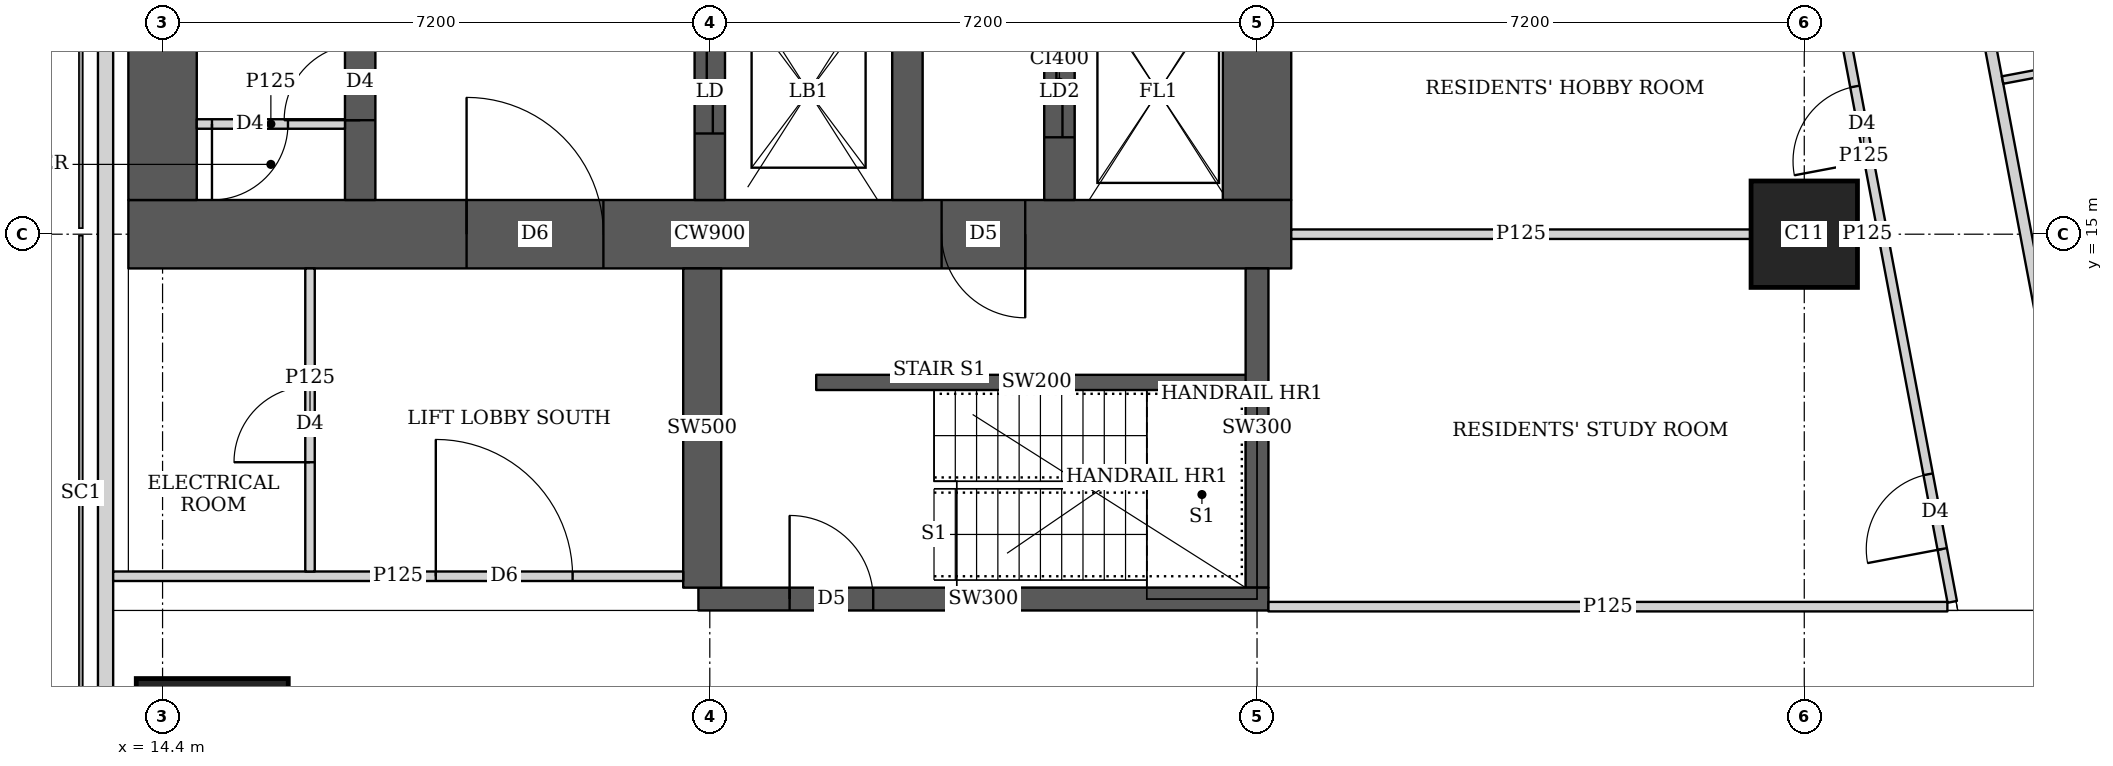
"""IFC4 building model, lengths in metres.
Left out: names, types, materials, properties, quantities, classifications, styles, units other than length and angle.
Written with IfcOpenShell. Run it as: python <this file> out.ifc"""

import sys

from ifc_helpers import new_model, si_unit, direction, frame, frame_2d, origin, origin_2d, place, context, subcontext, project, spatial, rectangle, extrude, element, fill, save


model = new_model("IFC4")
c1 = context("Model", 3, precision=1e-05, world=origin(), true_north=direction((0.0, 1.0)))
c2 = subcontext(c1, "Body", "Model", "MODEL_VIEW")
j1 = project(units=[si_unit("LENGTHUNIT", "METRE"), si_unit("PLANEANGLEUNIT", "RADIAN")], contexts=[c1])
p1 = place(None, origin())
s1 = spatial("IfcSite", under=j1, at=p1, CompositionType="ELEMENT")
p2 = place(p1, origin())
s2 = spatial("IfcBuilding", under=s1, at=p2, CompositionType="ELEMENT")
p3 = place(p2, frame((0.0, 0.0, 259.1)))
s3 = spatial("IfcBuildingStorey", under=s2, at=p3, CompositionType="ELEMENT", Elevation=259.1)
p4 = place(p3, frame((15.054, 8.154, 0.0), z_axis=(0.0, 0.0, 1.0), x_axis=(1.0, 0.0, 0.0)))
e1 = element("IfcColumn", 1, at=p4, inside=s3, PredefinedType="COLUMN", context=c2, shape_type="SweptSolid", body=[
    extrude(rectangle(XDim=2.0, YDim=2.0, at=origin_2d()), origin(), (0.0, 0.0, 1.0), 3.75),
])
p5 = place(p3, frame((36.0, 15.0, 0.0), z_axis=(0.0, 0.0, 1.0), x_axis=(1.0, 0.0, 0.0)))
e2 = element("IfcColumn", 2, at=p5, inside=s3, PredefinedType="COLUMN", context=c2, shape_type="SweptSolid", body=[
    extrude(rectangle(XDim=1.4, YDim=1.4, at=origin_2d()), origin(), (0.0, 0.0, 1.0), 3.75),
])
p6 = place(p3, frame((13.95, 15.0, 0.0), z_axis=(0.0, 0.0, 1.0), x_axis=(1.0, 0.0, 0.0)))
e3 = element("IfcWall", 3, at=p6, inside=s3, PredefinedType="SHEAR", context=c2, shape_type="SweptSolid", body=[
    extrude(rectangle(XDim=15.3, YDim=0.9, at=frame_2d((7.65, 0.0))), origin(), (0.0, 0.0, 1.0), 3.75),
])
p7 = place(p6, frame((4.45, 0.0, 0.0)))
e4 = element("IfcOpeningElement", 4, at=p7, cuts=e3, PredefinedType="OPENING", context=c2, shape_type="SweptSolid", body=[
    extrude(rectangle(XDim=1.8, YDim=2.1, at=frame_2d((0.9, 1.05))), frame((0.0, 0.46, 0.0), z_axis=(0.0, -1.0, 0.0), x_axis=(1.0, 0.0, 0.0)), (0.0, 0.0, 1.0), 0.92),
])
p8 = place(p6, frame((10.7, 0.0, 0.0)))
e5 = element("IfcOpeningElement", 5, at=p8, cuts=e3, PredefinedType="OPENING", context=c2, shape_type="SweptSolid", body=[
    extrude(rectangle(XDim=1.1, YDim=2.1, at=frame_2d((0.55, 1.05))), frame((0.0, 0.46, 0.0), z_axis=(0.0, -1.0, 0.0), x_axis=(1.0, 0.0, 0.0)), (0.0, 0.0, 1.0), 0.92),
])
for number, where, z_axis, x_axis in (
    (6, (14.4, 15.45, 0.0), (0.0, 0.0, 1.0), (0.0, 1.0, 0.0)),
    (7, (28.8, 15.45, 0.0), (0.0, 0.0, 1.0), (0.0, 1.0, 0.0)),
):
    element("IfcWall", number, at=place(p3, frame(where, z_axis=z_axis, x_axis=x_axis)), inside=s3, PredefinedType="SHEAR", context=c2, shape_type="SweptSolid", body=[
        extrude(rectangle(XDim=14.1, YDim=0.9, at=frame_2d((7.05, 0.0))), origin(), (0.0, 0.0, 1.0), 3.75),
    ])
p9 = place(p3, frame((17.0, 15.45, 0.0), z_axis=(0.0, 0.0, 1.0), x_axis=(0.0, 1.0, 0.0)))
e8 = element("IfcWall", 8, at=p9, inside=s3, PredefinedType="SHEAR", context=c2, shape_type="SweptSolid", body=[
    extrude(rectangle(XDim=14.1, YDim=0.4, at=frame_2d((7.05, 0.0))), origin(), (0.0, 0.0, 1.0), 3.75),
])
p10 = place(p9, frame((1.05, 0.0, 0.0)))
e9 = element("IfcOpeningElement", 9, at=p10, cuts=e8, PredefinedType="OPENING", context=c2, shape_type="SweptSolid", body=[
    extrude(rectangle(XDim=1.0, YDim=2.1, at=frame_2d((0.5, 1.05))), frame((0.0, 0.21, 0.0), z_axis=(0.0, -1.0, 0.0), x_axis=(1.0, 0.0, 0.0)), (0.0, 0.0, 1.0), 0.42),
])
p11 = place(p9, frame((4.675, 0.0, 0.0)))
e10 = element("IfcOpeningElement", 10, at=p11, cuts=e8, PredefinedType="OPENING", context=c2, shape_type="SweptSolid", body=[
    extrude(rectangle(XDim=1.0, YDim=2.1, at=frame_2d((0.5, 1.05))), frame((0.0, 0.21, 0.0), z_axis=(0.0, -1.0, 0.0), x_axis=(1.0, 0.0, 0.0)), (0.0, 0.0, 1.0), 0.42),
])
p12 = place(p9, frame((8.425, 0.0, 0.0)))
e11 = element("IfcOpeningElement", 11, at=p12, cuts=e8, PredefinedType="OPENING", context=c2, shape_type="SweptSolid", body=[
    extrude(rectangle(XDim=1.0, YDim=2.1, at=frame_2d((0.5, 1.05))), frame((0.0, 0.21, 0.0), z_axis=(0.0, -1.0, 0.0), x_axis=(1.0, 0.0, 0.0)), (0.0, 0.0, 1.0), 0.42),
])
p13 = place(p9, frame((12.175, 0.0, 0.0)))
e12 = element("IfcOpeningElement", 12, at=p13, cuts=e8, PredefinedType="OPENING", context=c2, shape_type="SweptSolid", body=[
    extrude(rectangle(XDim=1.0, YDim=2.1, at=frame_2d((0.5, 1.05))), frame((0.0, 0.21, 0.0), z_axis=(0.0, -1.0, 0.0), x_axis=(1.0, 0.0, 0.0)), (0.0, 0.0, 1.0), 0.42),
])
p14 = place(p3, frame((21.6, 15.45, 0.0), z_axis=(0.0, 0.0, 1.0), x_axis=(0.0, 1.0, 0.0)))
e13 = element("IfcWall", 13, at=p14, inside=s3, PredefinedType="SHEAR", context=c2, shape_type="SweptSolid", body=[
    extrude(rectangle(XDim=14.1, YDim=0.4, at=frame_2d((7.05, 0.0))), origin(), (0.0, 0.0, 1.0), 3.75),
])
p15 = place(p14, frame((0.875, 0.0, 0.0)))
e14 = element("IfcOpeningElement", 14, at=p15, cuts=e13, PredefinedType="OPENING", context=c2, shape_type="SweptSolid", body=[
    extrude(rectangle(XDim=1.1, YDim=2.1, at=frame_2d((0.55, 1.05))), frame((0.0, 0.21, 0.0), z_axis=(0.0, -1.0, 0.0), x_axis=(1.0, 0.0, 0.0)), (0.0, 0.0, 1.0), 0.42),
])
p16 = place(p14, frame((4.625, 0.0, 0.0)))
e15 = element("IfcOpeningElement", 15, at=p16, cuts=e13, PredefinedType="OPENING", context=c2, shape_type="SweptSolid", body=[
    extrude(rectangle(XDim=1.1, YDim=2.1, at=frame_2d((0.55, 1.05))), frame((0.0, 0.21, 0.0), z_axis=(0.0, -1.0, 0.0), x_axis=(1.0, 0.0, 0.0)), (0.0, 0.0, 1.0), 0.42),
])
p17 = place(p14, frame((8.375, 0.0, 0.0)))
e16 = element("IfcOpeningElement", 16, at=p17, cuts=e13, PredefinedType="OPENING", context=c2, shape_type="SweptSolid", body=[
    extrude(rectangle(XDim=1.1, YDim=2.1, at=frame_2d((0.55, 1.05))), frame((0.0, 0.21, 0.0), z_axis=(0.0, -1.0, 0.0), x_axis=(1.0, 0.0, 0.0)), (0.0, 0.0, 1.0), 0.42),
])
p18 = place(p14, frame((12.125, 0.0, 0.0)))
e17 = element("IfcOpeningElement", 17, at=p18, cuts=e13, PredefinedType="OPENING", context=c2, shape_type="SweptSolid", body=[
    extrude(rectangle(XDim=1.1, YDim=2.1, at=frame_2d((0.55, 1.05))), frame((0.0, 0.21, 0.0), z_axis=(0.0, -1.0, 0.0), x_axis=(1.0, 0.0, 0.0)), (0.0, 0.0, 1.0), 0.42),
])
p19 = place(p3, frame((24.2, 15.45, 0.0), z_axis=(0.0, 0.0, 1.0), x_axis=(0.0, 1.0, 0.0)))
e18 = element("IfcWall", 18, at=p19, inside=s3, PredefinedType="SHEAR", context=c2, shape_type="SweptSolid", body=[
    extrude(rectangle(XDim=14.1, YDim=0.4, at=frame_2d((7.05, 0.0))), origin(), (0.0, 0.0, 1.0), 3.75),
])
p20 = place(p3, frame((26.2, 15.45, 0.0), z_axis=(0.0, 0.0, 1.0), x_axis=(0.0, 1.0, 0.0)))
e19 = element("IfcWall", 19, at=p20, inside=s3, PredefinedType="SHEAR", context=c2, shape_type="SweptSolid", body=[
    extrude(rectangle(XDim=3.1, YDim=0.4, at=frame_2d((1.55, 0.0))), origin(), (0.0, 0.0, 1.0), 3.75),
])
p21 = place(p20, frame((0.825, 0.0, 0.0)))
e20 = element("IfcOpeningElement", 20, at=p21, cuts=e19, PredefinedType="OPENING", context=c2, shape_type="SweptSolid", body=[
    extrude(rectangle(XDim=1.2, YDim=2.1, at=frame_2d((0.6, 1.05))), frame((0.0, 0.21, 0.0), z_axis=(0.0, -1.0, 0.0), x_axis=(1.0, 0.0, 0.0)), (0.0, 0.0, 1.0), 0.42),
])
p22 = place(p3, frame((21.45, 10.2, 0.0), z_axis=(0.0, 0.0, 1.0), x_axis=(1.0, 0.0, 0.0)))
e21 = element("IfcWall", 21, at=p22, inside=s3, PredefinedType="SHEAR", context=c2, shape_type="SweptSolid", body=[
    extrude(rectangle(XDim=7.5, YDim=0.3, at=frame_2d((3.75, 0.0))), origin(), (0.0, 0.0, 1.0), 3.75),
])
p23 = place(p22, frame((1.2, 0.0, 0.0)))
e22 = element("IfcOpeningElement", 22, at=p23, cuts=e21, PredefinedType="OPENING", context=c2, shape_type="SweptSolid", body=[
    extrude(rectangle(XDim=1.1, YDim=2.1, at=frame_2d((0.55, 1.05))), frame((0.0, 0.16, 0.0), z_axis=(0.0, -1.0, 0.0), x_axis=(1.0, 0.0, 0.0)), (0.0, 0.0, 1.0), 0.32),
])
p24 = place(p3, frame((21.5, 10.35, 0.0), z_axis=(0.0, 0.0, 1.0), x_axis=(0.0, 1.0, 0.0)))
e23 = element("IfcWall", 23, at=p24, inside=s3, PredefinedType="SHEAR", context=c2, shape_type="SweptSolid", body=[
    extrude(rectangle(XDim=4.2, YDim=0.5, at=frame_2d((2.1, 0.0))), origin(), (0.0, 0.0, 1.0), 3.75),
])
p25 = place(p3, frame((28.8, 10.35, 0.0), z_axis=(0.0, 0.0, 1.0), x_axis=(0.0, 1.0, 0.0)))
e24 = element("IfcWall", 24, at=p25, inside=s3, PredefinedType="SHEAR", context=c2, shape_type="SweptSolid", body=[
    extrude(rectangle(XDim=4.2, YDim=0.3, at=frame_2d((2.1, 0.0))), origin(), (0.0, 0.0, 1.0), 3.75),
])
p26 = place(p3, frame((13.65, 43.037, 0.0), z_axis=(0.0, 0.0, 1.0), x_axis=(0.0, -1.0, 0.0)))
e25 = element("IfcWall", 25, at=p26, inside=s3, PredefinedType="SOLIDWALL", context=c2, shape_type="SweptSolid", body=[
    extrude(rectangle(XDim=35.374, YDim=0.2, at=frame_2d((17.687, 0.0))), origin(), (0.0, 0.0, 1.0), 3.5),
])
p27 = place(p26, frame((1.959, 0.0, 0.9)))
e26 = element("IfcOpeningElement", 26, at=p27, cuts=e25, PredefinedType="OPENING", context=c2, shape_type="SweptSolid", body=[
    extrude(rectangle(XDim=1.8, YDim=1.5, at=frame_2d((0.9, 0.75))), frame((0.0, 0.11, 0.0), z_axis=(0.0, -1.0, 0.0), x_axis=(1.0, 0.0, 0.0)), (0.0, 0.0, 1.0), 0.22),
])
p28 = place(p3, frame((33.781, 42.186, 0.0), z_axis=(0.0, 0.0, 1.0), x_axis=(0.185593518645, -0.9826266055, 0.0)))
e27 = element("IfcWall", 27, at=p28, inside=s3, PredefinedType="SOLIDWALL", context=c2, shape_type="SweptSolid", body=[
    extrude(rectangle(XDim=35.961, YDim=0.15, at=frame_2d((17.98, 0.0))), origin(), (0.0, 0.0, 1.0), 2.5),
])
p29 = place(p28, frame((7.183, 0.0, 0.0)))
e28 = element("IfcOpeningElement", 28, at=p29, cuts=e27, PredefinedType="OPENING", context=c2, shape_type="SweptSolid", body=[
    extrude(rectangle(XDim=1.0, YDim=2.1, at=frame_2d((0.5, 1.05))), frame((0.0, 0.085, 0.0), z_axis=(0.0, -1.0, 0.0), x_axis=(1.0, 0.0, 0.0)), (0.0, 0.0, 1.0), 0.17),
])
p30 = place(p28, frame((11.76, 0.0, 0.0)))
e29 = element("IfcOpeningElement", 29, at=p30, cuts=e27, PredefinedType="OPENING", context=c2, shape_type="SweptSolid", body=[
    extrude(rectangle(XDim=1.0, YDim=2.1, at=frame_2d((0.5, 1.05))), frame((0.0, 0.085, 0.0), z_axis=(0.0, -1.0, 0.0), x_axis=(1.0, 0.0, 0.0)), (0.0, 0.0, 1.0), 0.17),
])
p31 = place(p28, frame((23.863, 0.0, 0.0)))
e30 = element("IfcOpeningElement", 30, at=p31, cuts=e27, PredefinedType="OPENING", context=c2, shape_type="SweptSolid", body=[
    extrude(rectangle(XDim=1.0, YDim=2.1, at=frame_2d((0.5, 1.05))), frame((0.0, 0.085, 0.0), z_axis=(0.0, -1.0, 0.0), x_axis=(1.0, 0.0, 0.0)), (0.0, 0.0, 1.0), 0.17),
])
p32 = place(p28, frame((30.502, 0.0, 0.0)))
e31 = element("IfcOpeningElement", 31, at=p32, cuts=e27, PredefinedType="OPENING", context=c2, shape_type="SweptSolid", body=[
    extrude(rectangle(XDim=1.0, YDim=2.1, at=frame_2d((0.5, 1.05))), frame((0.0, 0.085, 0.0), z_axis=(0.0, -1.0, 0.0), x_axis=(1.0, 0.0, 0.0)), (0.0, 0.0, 1.0), 0.17),
])
p33 = place(p3, frame((42.074, 17.682, 0.0), z_axis=(0.0, 0.0, 1.0), x_axis=(-0.982660701716, -0.185412904897, 0.0)))
e32 = element("IfcWall", 32, at=p33, inside=s3, PredefinedType="PARTITIONING", context=c2, shape_type="SweptSolid", body=[
    extrude(rectangle(XDim=3.526, YDim=0.1, at=frame_2d((1.763, 0.0))), origin(), (0.0, 0.0, 1.0), 3.5),
])
p34 = place(p33, frame((1.326, 0.0, 0.0)))
e33 = element("IfcOpeningElement", 33, at=p34, cuts=e32, PredefinedType="OPENING", context=c2, shape_type="SweptSolid", body=[
    extrude(rectangle(XDim=0.9, YDim=2.1, at=frame_2d((0.45, 1.05))), frame((0.0, 0.06, 0.0), z_axis=(0.0, -1.0, 0.0), x_axis=(1.0, 0.0, 0.0)), (0.0, 0.0, 1.0), 0.12),
])
p35 = place(p3, frame((13.75, 10.5, 0.0), z_axis=(0.0, 0.0, 1.0), x_axis=(1.0, 0.0, 0.0)))
e34 = element("IfcWall", 34, at=p35, inside=s3, PredefinedType="PARTITIONING", context=c2, shape_type="SweptSolid", body=[
    extrude(rectangle(XDim=7.5, YDim=0.125, at=frame_2d((3.75, 0.0))), origin(), (0.0, 0.0, 1.0), 3.5),
])
p36 = place(p35, frame((4.245, 0.0, 0.0)))
e35 = element("IfcOpeningElement", 35, at=p36, cuts=e34, PredefinedType="OPENING", context=c2, shape_type="SweptSolid", body=[
    extrude(rectangle(XDim=1.8, YDim=2.1, at=frame_2d((0.9, 1.05))), frame((0.0, 0.073, 0.0), z_axis=(0.0, -1.0, 0.0), x_axis=(1.0, 0.0, 0.0)), (0.0, 0.0, 1.0), 0.145),
])
p37 = place(p3, frame((16.34, 10.562, 0.0), z_axis=(0.0, 0.0, 1.0), x_axis=(0.0, 1.0, 0.0)))
e36 = element("IfcWall", 36, at=p37, inside=s3, PredefinedType="PARTITIONING", context=c2, shape_type="SweptSolid", body=[
    extrude(rectangle(XDim=3.988, YDim=0.125, at=frame_2d((1.994, 0.0))), origin(), (0.0, 0.0, 1.0), 3.5),
])
p38 = place(p37, frame((1.438, 0.0, 0.0)))
e37 = element("IfcOpeningElement", 37, at=p38, cuts=e36, PredefinedType="OPENING", context=c2, shape_type="SweptSolid", body=[
    extrude(rectangle(XDim=1.0, YDim=2.1, at=frame_2d((0.5, 1.05))), frame((0.0, 0.073, 0.0), z_axis=(0.0, -1.0, 0.0), x_axis=(1.0, 0.0, 0.0)), (0.0, 0.0, 1.0), 0.145),
])
p39 = place(p3, frame((28.95, 10.1, 0.0), z_axis=(0.0, 0.0, 1.0), x_axis=(1.0, 0.0, 0.0)))
e38 = element("IfcWall", 38, at=p39, inside=s3, PredefinedType="PARTITIONING", context=c2, shape_type="SweptSolid", body=[
    extrude(rectangle(XDim=8.933, YDim=0.125, at=frame_2d((4.467, 0.0))), origin(), (0.0, 0.0, 1.0), 3.5),
])
p40 = place(p3, frame((37.947, 10.163, 0.0), z_axis=(0.0, 0.0, 1.0), x_axis=(-0.185589250699, 0.982627411599, 0.0)))
e39 = element("IfcWall", 39, at=p40, inside=s3, PredefinedType="PARTITIONING", context=c2, shape_type="SweptSolid", body=[
    extrude(rectangle(XDim=12.555, YDim=0.125, at=frame_2d((6.277, 0.0))), origin(), (0.0, 0.0, 1.0), 2.5),
])
p41 = place(p40, frame((0.708, 0.0, 0.0)))
e40 = element("IfcOpeningElement", 40, at=p41, cuts=e39, PredefinedType="OPENING", context=c2, shape_type="SweptSolid", body=[
    extrude(rectangle(XDim=1.0, YDim=2.1, at=frame_2d((0.5, 1.05))), frame((0.0, 0.073, 0.0), z_axis=(0.0, -1.0, 0.0), x_axis=(1.0, 0.0, 0.0)), (0.0, 0.0, 1.0), 0.145),
])
p42 = place(p40, frame((5.9, 0.0, 0.0)))
e41 = element("IfcOpeningElement", 41, at=p42, cuts=e39, PredefinedType="OPENING", context=c2, shape_type="SweptSolid", body=[
    extrude(rectangle(XDim=1.0, YDim=2.1, at=frame_2d((0.5, 1.05))), frame((0.0, 0.073, 0.0), z_axis=(0.0, -1.0, 0.0), x_axis=(1.0, 0.0, 0.0)), (0.0, 0.0, 1.0), 0.145),
])
p43 = place(p40, frame((9.562, 0.0, 0.0)))
e42 = element("IfcOpeningElement", 42, at=p43, cuts=e39, PredefinedType="OPENING", context=c2, shape_type="SweptSolid", body=[
    extrude(rectangle(XDim=1.0, YDim=2.1, at=frame_2d((0.5, 1.05))), frame((0.0, 0.073, 0.0), z_axis=(0.0, -1.0, 0.0), x_axis=(1.0, 0.0, 0.0)), (0.0, 0.0, 1.0), 0.145),
])
p44 = place(p3, frame((29.25, 15.0, 0.0), z_axis=(0.0, 0.0, 1.0), x_axis=(1.0, 0.0, 0.0)))
e43 = element("IfcWall", 43, at=p44, inside=s3, PredefinedType="PARTITIONING", context=c2, shape_type="SweptSolid", body=[
    extrude(rectangle(XDim=6.049, YDim=0.125, at=frame_2d((3.024, 0.0))), origin(), (0.0, 0.0, 1.0), 3.5),
])
p45 = place(p3, frame((36.701, 15.0, 0.0), z_axis=(0.0, 0.0, 1.0), x_axis=(1.0, 0.0, 0.0)))
e44 = element("IfcWall", 44, at=p45, inside=s3, PredefinedType="PARTITIONING", context=c2, shape_type="SweptSolid", body=[
    extrude(rectangle(XDim=0.257, YDim=0.125, at=frame_2d((0.128, 0.0))), origin(), (0.0, 0.0, 1.0), 3.5),
])
p46 = place(p3, frame((14.85, 16.45, 0.0), z_axis=(0.0, 0.0, 1.0), x_axis=(1.0, 0.0, 0.0)))
e45 = element("IfcWall", 45, at=p46, inside=s3, PredefinedType="PARTITIONING", context=c2, shape_type="SweptSolid", body=[
    extrude(rectangle(XDim=1.95, YDim=0.125, at=frame_2d((0.975, 0.0))), origin(), (0.0, 0.0, 1.0), 3.5),
])
p47 = place(p46, frame((0.2, 0.0, 0.0)))
e46 = element("IfcOpeningElement", 46, at=p47, cuts=e45, PredefinedType="OPENING", context=c2, shape_type="SweptSolid", body=[
    extrude(rectangle(XDim=1.0, YDim=2.1, at=frame_2d((0.5, 1.05))), frame((0.0, 0.073, 0.0), z_axis=(0.0, -1.0, 0.0), x_axis=(1.0, 0.0, 0.0)), (0.0, 0.0, 1.0), 0.145),
])
p48 = place(p3, frame((23.0, 13.05, 0.0), z_axis=(0.0, 0.0, 1.0), x_axis=(1.0, 0.0, 0.0)))
e47 = element("IfcWall", 47, at=p48, inside=s3, PredefinedType="SHEAR", context=c2, shape_type="SweptSolid", body=[
    extrude(rectangle(XDim=5.8, YDim=0.2, at=frame_2d((2.9, 0.0))), origin(), (0.0, 0.0, 1.0), 3.75),
])
p49 = place(p38, origin())
e48 = element("IfcDoor", 48, at=p49, inside=s3, OperationType="SINGLE_SWING_LEFT", PredefinedType="DOOR", context=c2, shape_type="SweptSolid", body=[
    extrude(rectangle(XDim=1.0, YDim=2.1, at=frame_2d((0.5, 1.05))), frame((0.0, 0.025, 0.0), z_axis=(0.0, -1.0, 0.0), x_axis=(1.0, 0.0, 0.0)), (0.0, 0.0, 1.0), 0.05),
])
fill(e37, e48)
p50 = place(p36, origin())
e49 = element("IfcDoor", 49, at=p50, inside=s3, OperationType="DOUBLE_DOOR_SINGLE_SWING", PredefinedType="DOOR", context=c2, shape_type="SweptSolid", body=[
    extrude(rectangle(XDim=1.8, YDim=2.1, at=frame_2d((0.9, 1.05))), frame((0.0, 0.025, 0.0), z_axis=(0.0, -1.0, 0.0), x_axis=(1.0, 0.0, 0.0)), (0.0, 0.0, 1.0), 0.05),
])
fill(e35, e49)
p51 = place(p41, origin())
e50 = element("IfcDoor", 50, at=p51, inside=s3, OperationType="SINGLE_SWING_LEFT", PredefinedType="DOOR", context=c2, shape_type="SweptSolid", body=[
    extrude(rectangle(XDim=1.0, YDim=2.1, at=frame_2d((0.5, 1.05))), frame((0.0, 0.025, 0.0), z_axis=(0.0, -1.0, 0.0), x_axis=(1.0, 0.0, 0.0)), (0.0, 0.0, 1.0), 0.05),
])
fill(e40, e50)
p52 = place(p42, origin())
e51 = element("IfcDoor", 51, at=p52, inside=s3, OperationType="SINGLE_SWING_LEFT", PredefinedType="DOOR", context=c2, shape_type="SweptSolid", body=[
    extrude(rectangle(XDim=1.0, YDim=2.1, at=frame_2d((0.5, 1.05))), frame((0.0, 0.025, 0.0), z_axis=(0.0, -1.0, 0.0), x_axis=(1.0, 0.0, 0.0)), (0.0, 0.0, 1.0), 0.05),
])
fill(e41, e51)
p53 = place(p47, origin())
e52 = element("IfcDoor", 52, at=p53, inside=s3, OperationType="SINGLE_SWING_RIGHT", PredefinedType="DOOR", context=c2, shape_type="SweptSolid", body=[
    extrude(rectangle(XDim=1.0, YDim=2.1, at=frame_2d((0.5, 1.05))), frame((0.0, 0.025, 0.0), z_axis=(0.0, -1.0, 0.0), x_axis=(1.0, 0.0, 0.0)), (0.0, 0.0, 1.0), 0.05),
])
fill(e46, e52)
p54 = place(p10, origin())
e53 = element("IfcDoor", 53, at=p54, inside=s3, OperationType="SINGLE_SWING_LEFT", PredefinedType="DOOR", context=c2, shape_type="SweptSolid", body=[
    extrude(rectangle(XDim=1.0, YDim=2.1, at=frame_2d((0.5, 1.05))), frame((0.0, 0.025, 0.0), z_axis=(0.0, -1.0, 0.0), x_axis=(1.0, 0.0, 0.0)), (0.0, 0.0, 1.0), 0.05),
])
fill(e9, e53)
p55 = place(p7, origin())
e54 = element("IfcDoor", 54, at=p55, inside=s3, OperationType="DOUBLE_DOOR_SINGLE_SWING", PredefinedType="DOOR", context=c2, shape_type="SweptSolid", body=[
    extrude(rectangle(XDim=1.8, YDim=2.1, at=frame_2d((0.9, 1.05))), frame((0.0, 0.025, 0.0), z_axis=(0.0, -1.0, 0.0), x_axis=(1.0, 0.0, 0.0)), (0.0, 0.0, 1.0), 0.05),
])
fill(e4, e54)
p56 = place(p8, origin())
e55 = element("IfcDoor", 55, at=p56, inside=s3, OperationType="SINGLE_SWING_LEFT", PredefinedType="DOOR", context=c2, shape_type="SweptSolid", body=[
    extrude(rectangle(XDim=1.1, YDim=2.1, at=frame_2d((0.55, 1.05))), frame((0.0, 0.025, 0.0), z_axis=(0.0, -1.0, 0.0), x_axis=(1.0, 0.0, 0.0)), (0.0, 0.0, 1.0), 0.05),
])
fill(e5, e55)
p57 = place(p21, origin())
e56 = element("IfcDoor", 56, at=p57, inside=s3, OperationType="DOUBLE_DOOR_SLIDING", PredefinedType="DOOR", context=c2, shape_type="SweptSolid", body=[
    extrude(rectangle(XDim=1.2, YDim=2.1, at=frame_2d((0.6, 1.05))), frame((0.0, 0.025, 0.0), z_axis=(0.0, -1.0, 0.0), x_axis=(1.0, 0.0, 0.0)), (0.0, 0.0, 1.0), 0.05),
])
fill(e20, e56)
p58 = place(p15, origin())
e57 = element("IfcDoor", 57, at=p58, inside=s3, OperationType="DOUBLE_DOOR_SLIDING", PredefinedType="DOOR", context=c2, shape_type="SweptSolid", body=[
    extrude(rectangle(XDim=1.1, YDim=2.1, at=frame_2d((0.55, 1.05))), frame((0.0, 0.025, 0.0), z_axis=(0.0, -1.0, 0.0), x_axis=(1.0, 0.0, 0.0)), (0.0, 0.0, 1.0), 0.05),
])
fill(e14, e57)
p59 = place(p23, origin())
e58 = element("IfcDoor", 58, at=p59, inside=s3, OperationType="SINGLE_SWING_LEFT", PredefinedType="DOOR", context=c2, shape_type="SweptSolid", body=[
    extrude(rectangle(XDim=1.1, YDim=2.1, at=frame_2d((0.55, 1.05))), frame((0.0, 0.025, 0.0), z_axis=(0.0, -1.0, 0.0), x_axis=(1.0, 0.0, 0.0)), (0.0, 0.0, 1.0), 0.05),
])
fill(e22, e58)
save(model, sys.argv[1])
